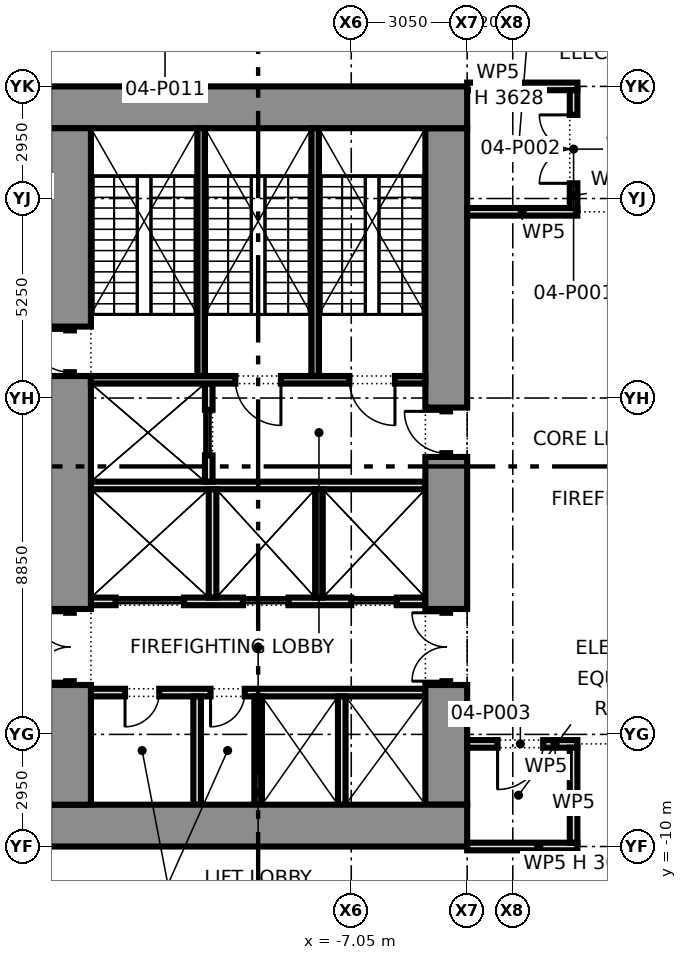
"""IFC4 building model, lengths in metres.
Left out: names, types, materials, properties, quantities, classifications, styles, units other than length and angle.
Written with IfcOpenShell. Run it as: python <this file> out.ifc"""

import sys

from ifc_helpers import new_model, si_unit, direction, frame, frame_2d, origin, place, context, subcontext, project, spatial, rectangle, extrude, element, fill, save


model = new_model("IFC4")
c1 = context("Model", 3, precision=1e-05, world=origin(), true_north=direction((0.0, 1.0)))
c2 = subcontext(c1, "Body", "Model", "MODEL_VIEW")
j1 = project(units=[si_unit("LENGTHUNIT", "METRE"), si_unit("PLANEANGLEUNIT", "RADIAN")], contexts=[c1])
p1 = place(None, origin())
s1 = spatial("IfcSite", under=j1, at=p1, CompositionType="ELEMENT")
p2 = place(p1, origin())
s2 = spatial("IfcBuilding", under=s1, at=p2, CompositionType="ELEMENT")
p3 = place(p2, frame((0.0, 0.0, 16.1)))
s3 = spatial("IfcBuildingStorey", under=s2, at=p3, CompositionType="ELEMENT", Elevation=16.1)
for number, where, z_axis, x_axis in (
    (1, (-15.0, -9.45, 0.0), (0.0, 0.0, 1.0), (1.0, 0.0, 0.0)),
    (2, (-15.0, 9.45, 0.0), (0.0, 0.0, 1.0), (1.0, 0.0, 0.0)),
):
    element("IfcWall", number, at=place(p3, frame(where, z_axis=z_axis, x_axis=x_axis)), inside=s3, PredefinedType="SHEAR", context=c2, shape_type="SweptSolid", body=[
        extrude(rectangle(XDim=11.0, YDim=1.1, at=frame_2d((5.5, 0.0))), origin(), (0.0, 0.0, 1.0), 4.575),
    ])
p4 = place(p3, frame((-14.45, -8.9, 0.0), z_axis=(0.0, 0.0, 1.0), x_axis=(0.0, 1.0, 0.0)))
e3 = element("IfcWall", 3, at=p4, inside=s3, PredefinedType="SHEAR", context=c2, shape_type="SweptSolid", body=[
    extrude(rectangle(XDim=3.15, YDim=1.1, at=frame_2d((1.575, 0.0))), origin(), (0.0, 0.0, 1.0), 4.575),
])
p5 = place(p3, frame((-14.45, -5.75, 0.0), z_axis=(0.0, 0.0, 1.0), x_axis=(0.0, 1.0, 0.0)))
e4 = element("IfcWall", 4, at=p5, inside=s3, PredefinedType="PARTITIONING", context=c2, shape_type="SweptSolid", body=[
    extrude(rectangle(XDim=2.0, YDim=0.2, at=frame_2d((1.0, 0.0))), origin(), (0.0, 0.0, 1.0), 2.4),
])
p6 = place(p5, frame((0.1, 0.0, 0.0)))
e5 = element("IfcOpeningElement", 5, at=p6, cuts=e4, PredefinedType="OPENING", context=c2, shape_type="SweptSolid", body=[
    extrude(rectangle(XDim=1.8, YDim=2.1, at=frame_2d((0.9, 1.05))), frame((0.0, 0.11, 0.0), z_axis=(0.0, -1.0, 0.0), x_axis=(1.0, 0.0, 0.0)), (0.0, 0.0, 1.0), 0.22),
])
p7 = place(p3, frame((-14.45, -3.75, 0.0), z_axis=(0.0, 0.0, 1.0), x_axis=(0.0, 1.0, 0.0)))
e6 = element("IfcWall", 6, at=p7, inside=s3, PredefinedType="SHEAR", context=c2, shape_type="SweptSolid", body=[
    extrude(rectangle(XDim=6.13, YDim=1.1, at=frame_2d((3.065, 0.0))), origin(), (0.0, 0.0, 1.0), 4.575),
])
p8 = place(p3, frame((-14.45, 2.38, 0.0), z_axis=(0.0, 0.0, 1.0), x_axis=(0.0, 1.0, 0.0)))
e7 = element("IfcWall", 7, at=p8, inside=s3, PredefinedType="SHEAR", context=c2, shape_type="SweptSolid", body=[
    extrude(rectangle(XDim=1.3, YDim=0.2, at=frame_2d((0.65, 0.0))), origin(), (0.0, 0.0, 1.0), 2.4),
])
p9 = place(p8, frame((0.1, 0.0, 0.0)))
e8 = element("IfcOpeningElement", 8, at=p9, cuts=e7, PredefinedType="OPENING", context=c2, shape_type="SweptSolid", body=[
    extrude(rectangle(XDim=1.1, YDim=2.1, at=frame_2d((0.55, 1.05))), frame((0.0, 0.11, 0.0), z_axis=(0.0, -1.0, 0.0), x_axis=(1.0, 0.0, 0.0)), (0.0, 0.0, 1.0), 0.22),
])
p10 = place(p3, frame((-14.45, 3.68, 0.0), z_axis=(0.0, 0.0, 1.0), x_axis=(0.0, 1.0, 0.0)))
e9 = element("IfcWall", 9, at=p10, inside=s3, PredefinedType="SHEAR", context=c2, shape_type="SweptSolid", body=[
    extrude(rectangle(XDim=5.22, YDim=1.1, at=frame_2d((2.61, 0.0))), origin(), (0.0, 0.0, 1.0), 4.575),
])
p11 = place(p3, frame((-4.55, -8.9, 0.0), z_axis=(0.0, 0.0, 1.0), x_axis=(0.0, 1.0, 0.0)))
e10 = element("IfcWall", 10, at=p11, inside=s3, PredefinedType="SHEAR", context=c2, shape_type="SweptSolid", body=[
    extrude(rectangle(XDim=3.15, YDim=1.1, at=frame_2d((1.575, 0.0))), origin(), (0.0, 0.0, 1.0), 4.575),
])
p12 = place(p3, frame((-4.55, -5.75, 0.0), z_axis=(0.0, 0.0, 1.0), x_axis=(0.0, 1.0, 0.0)))
e11 = element("IfcWall", 11, at=p12, inside=s3, PredefinedType="PARTITIONING", context=c2, shape_type="SweptSolid", body=[
    extrude(rectangle(XDim=2.0, YDim=0.2, at=frame_2d((1.0, 0.0))), origin(), (0.0, 0.0, 1.0), 2.4),
])
p13 = place(p12, frame((0.1, 0.0, 0.0)))
e12 = element("IfcOpeningElement", 12, at=p13, cuts=e11, PredefinedType="OPENING", context=c2, shape_type="SweptSolid", body=[
    extrude(rectangle(XDim=1.8, YDim=2.1, at=frame_2d((0.9, 1.05))), frame((0.0, 0.11, 0.0), z_axis=(0.0, -1.0, 0.0), x_axis=(1.0, 0.0, 0.0)), (0.0, 0.0, 1.0), 0.22),
])
p14 = place(p3, frame((-4.55, -3.75, 0.0), z_axis=(0.0, 0.0, 1.0), x_axis=(0.0, 1.0, 0.0)))
e13 = element("IfcWall", 13, at=p14, inside=s3, PredefinedType="SHEAR", context=c2, shape_type="SweptSolid", body=[
    extrude(rectangle(XDim=4.0, YDim=1.1, at=frame_2d((2.0, 0.0))), origin(), (0.0, 0.0, 1.0), 4.575),
])
p15 = place(p3, frame((-4.55, 0.25, 0.0), z_axis=(0.0, 0.0, 1.0), x_axis=(0.0, 1.0, 0.0)))
e14 = element("IfcWall", 14, at=p15, inside=s3, PredefinedType="PARTITIONING", context=c2, shape_type="SweptSolid", body=[
    extrude(rectangle(XDim=1.3, YDim=0.2, at=frame_2d((0.65, 0.0))), origin(), (0.0, 0.0, 1.0), 2.4),
])
p16 = place(p15, frame((0.1, 0.0, 0.0)))
e15 = element("IfcOpeningElement", 15, at=p16, cuts=e14, PredefinedType="OPENING", context=c2, shape_type="SweptSolid", body=[
    extrude(rectangle(XDim=1.1, YDim=2.1, at=frame_2d((0.55, 1.05))), frame((0.0, 0.11, 0.0), z_axis=(0.0, -1.0, 0.0), x_axis=(1.0, 0.0, 0.0)), (0.0, 0.0, 1.0), 0.22),
])
p17 = place(p3, frame((-4.55, 1.55, 0.0), z_axis=(0.0, 0.0, 1.0), x_axis=(0.0, 1.0, 0.0)))
e16 = element("IfcWall", 16, at=p17, inside=s3, PredefinedType="SHEAR", context=c2, shape_type="SweptSolid", body=[
    extrude(rectangle(XDim=7.35, YDim=1.1, at=frame_2d((3.675, 0.0))), origin(), (0.0, 0.0, 1.0), 4.575),
])
p18 = place(p3, frame((-13.9, -5.95, 0.0), z_axis=(0.0, 0.0, 1.0), x_axis=(1.0, 0.0, 0.0)))
e17 = element("IfcWall", 17, at=p18, inside=s3, PredefinedType="PARTITIONING", context=c2, shape_type="SweptSolid", body=[
    extrude(rectangle(XDim=8.8, YDim=0.2, at=frame_2d((4.4, 0.0))), origin(), (0.0, 0.0, 1.0), 4.575),
])
p19 = place(p18, frame((0.897, 0.0, 0.0)))
e18 = element("IfcOpeningElement", 18, at=p19, cuts=e17, PredefinedType="OPENING", context=c2, shape_type="SweptSolid", body=[
    extrude(rectangle(XDim=0.9, YDim=2.1, at=frame_2d((0.45, 1.05))), frame((0.0, 0.11, 0.0), z_axis=(0.0, -1.0, 0.0), x_axis=(1.0, 0.0, 0.0)), (0.0, 0.0, 1.0), 0.22),
])
p20 = place(p18, frame((3.147, 0.0, 0.0)))
e19 = element("IfcOpeningElement", 19, at=p20, cuts=e17, PredefinedType="OPENING", context=c2, shape_type="SweptSolid", body=[
    extrude(rectangle(XDim=0.9, YDim=2.1, at=frame_2d((0.45, 1.05))), frame((0.0, 0.11, 0.0), z_axis=(0.0, -1.0, 0.0), x_axis=(1.0, 0.0, 0.0)), (0.0, 0.0, 1.0), 0.22),
])
p21 = place(p3, frame((-13.9, -3.55, 0.0), z_axis=(0.0, 0.0, 1.0), x_axis=(1.0, 0.0, 0.0)))
e20 = element("IfcWall", 20, at=p21, inside=s3, PredefinedType="PARTITIONING", context=c2, shape_type="SweptSolid", body=[
    extrude(rectangle(XDim=8.8, YDim=0.2, at=frame_2d((4.4, 0.0))), origin(), (0.0, 0.0, 1.0), 4.575),
])
p22 = place(p21, frame((0.65, 0.0, 0.0)))
e21 = element("IfcOpeningElement", 21, at=p22, cuts=e20, PredefinedType="OPENING", context=c2, shape_type="SweptSolid", body=[
    extrude(rectangle(XDim=1.8, YDim=2.1, at=frame_2d((0.9, 1.05))), frame((0.0, 0.11, 0.0), z_axis=(0.0, -1.0, 0.0), x_axis=(1.0, 0.0, 0.0)), (0.0, 0.0, 1.0), 0.22),
])
p23 = place(p21, frame((4.0, 0.0, 0.0)))
e22 = element("IfcOpeningElement", 22, at=p23, cuts=e20, PredefinedType="OPENING", context=c2, shape_type="SweptSolid", body=[
    extrude(rectangle(XDim=1.2, YDim=2.1, at=frame_2d((0.6, 1.05))), frame((0.0, 0.11, 0.0), z_axis=(0.0, -1.0, 0.0), x_axis=(1.0, 0.0, 0.0)), (0.0, 0.0, 1.0), 0.22),
])
p24 = place(p21, frame((6.85, 0.0, 0.0)))
e23 = element("IfcOpeningElement", 23, at=p24, cuts=e20, PredefinedType="OPENING", context=c2, shape_type="SweptSolid", body=[
    extrude(rectangle(XDim=1.2, YDim=2.1, at=frame_2d((0.6, 1.05))), frame((0.0, 0.11, 0.0), z_axis=(0.0, -1.0, 0.0), x_axis=(1.0, 0.0, 0.0)), (0.0, 0.0, 1.0), 0.22),
])
p25 = place(p3, frame((-13.9, -0.5, 0.0), z_axis=(0.0, 0.0, 1.0), x_axis=(1.0, 0.0, 0.0)))
e24 = element("IfcWall", 24, at=p25, inside=s3, PredefinedType="PARTITIONING", context=c2, shape_type="SweptSolid", body=[
    extrude(rectangle(XDim=8.8, YDim=0.2, at=frame_2d((4.4, 0.0))), origin(), (0.0, 0.0, 1.0), 4.575),
])
p26 = place(p3, frame((-10.8, -0.4, 0.0), z_axis=(0.0, 0.0, 1.0), x_axis=(0.0, 1.0, 0.0)))
e25 = element("IfcWall", 25, at=p26, inside=s3, PredefinedType="PARTITIONING", context=c2, shape_type="SweptSolid", body=[
    extrude(rectangle(XDim=2.58, YDim=0.2, at=frame_2d((1.29, 0.0))), origin(), (0.0, 0.0, 1.0), 4.575),
])
p27 = place(p26, frame((0.69, 0.0, 0.0)))
e26 = element("IfcOpeningElement", 26, at=p27, cuts=e25, PredefinedType="OPENING", context=c2, shape_type="SweptSolid", body=[
    extrude(rectangle(XDim=1.2, YDim=2.1, at=frame_2d((0.6, 1.05))), frame((0.0, 0.11, 0.0), z_axis=(0.0, -1.0, 0.0), x_axis=(1.0, 0.0, 0.0)), (0.0, 0.0, 1.0), 0.22),
])
p28 = place(p3, frame((-13.9, 2.28, 0.0), z_axis=(0.0, 0.0, 1.0), x_axis=(1.0, 0.0, 0.0)))
e27 = element("IfcWall", 27, at=p28, inside=s3, PredefinedType="SHEAR", context=c2, shape_type="SweptSolid", body=[
    extrude(rectangle(XDim=8.8, YDim=0.2, at=frame_2d((4.4, 0.0))), origin(), (0.0, 0.0, 1.0), 4.575),
])
p29 = place(p28, frame((3.8, 0.0, 0.0)))
e28 = element("IfcOpeningElement", 28, at=p29, cuts=e27, PredefinedType="OPENING", context=c2, shape_type="SweptSolid", body=[
    extrude(rectangle(XDim=1.2, YDim=2.1, at=frame_2d((0.6, 1.05))), frame((0.0, 0.11, 0.0), z_axis=(0.0, -1.0, 0.0), x_axis=(1.0, 0.0, 0.0)), (0.0, 0.0, 1.0), 0.22),
])
p30 = place(p28, frame((6.8, 0.0, 0.0)))
e29 = element("IfcOpeningElement", 29, at=p30, cuts=e27, PredefinedType="OPENING", context=c2, shape_type="SweptSolid", body=[
    extrude(rectangle(XDim=1.2, YDim=2.1, at=frame_2d((0.6, 1.05))), frame((0.0, 0.11, 0.0), z_axis=(0.0, -1.0, 0.0), x_axis=(1.0, 0.0, 0.0)), (0.0, 0.0, 1.0), 0.22),
])
for number, where, z_axis, x_axis in (
    (30, (-11.0, 2.38, 0.0), (0.0, 0.0, 1.0), (0.0, 1.0, 0.0)),
    (31, (-8.0, 2.38, 0.0), (0.0, 0.0, 1.0), (0.0, 1.0, 0.0)),
):
    element("IfcWall", number, at=place(p3, frame(where, z_axis=z_axis, x_axis=x_axis)), inside=s3, PredefinedType="SHEAR", context=c2, shape_type="SweptSolid", body=[
        extrude(rectangle(XDim=6.52, YDim=0.2, at=frame_2d((3.26, 0.0))), origin(), (0.0, 0.0, 1.0), 4.575),
    ])
for number, where, z_axis, x_axis in (
    (32, (-9.5, -8.9, 0.0), (0.0, 0.0, 1.0), (0.0, 1.0, 0.0)),
    (33, (-7.3, -8.9, 0.0), (0.0, 0.0, 1.0), (0.0, 1.0, 0.0)),
    (34, (-11.105, -8.9, 0.0), (0.0, 0.0, 1.0), (0.0, 1.0, 0.0)),
    (35, (-10.7, -3.45, 0.0), (0.0, 0.0, 1.0), (0.0, 1.0, 0.0)),
    (36, (-7.9, -3.45, 0.0), (0.0, 0.0, 1.0), (0.0, 1.0, 0.0)),
):
    element("IfcWall", number, at=place(p3, frame(where, z_axis=z_axis, x_axis=x_axis)), inside=s3, PredefinedType="PARTITIONING", context=c2, shape_type="SweptSolid", body=[
        extrude(rectangle(XDim=2.85, YDim=0.2, at=frame_2d((1.425, 0.0))), origin(), (0.0, 0.0, 1.0), 4.575),
    ])
p31 = place(p3, frame((-4.0, -10.0, 0.0), z_axis=(0.0, 0.0, 1.0), x_axis=(1.0, 0.0, 0.0)))
e37 = element("IfcWall", 37, at=p31, inside=s3, PredefinedType="PARTITIONING", context=c2, shape_type="SweptSolid", body=[
    extrude(rectangle(XDim=2.9, YDim=0.2, at=frame_2d((1.45, 0.0))), origin(), (0.0, 0.0, 1.0), 3.627),
])
p32 = place(p3, frame((-4.0, -7.3, 0.0), z_axis=(0.0, 0.0, 1.0), x_axis=(1.0, 0.0, 0.0)))
e38 = element("IfcWall", 38, at=p32, inside=s3, PredefinedType="PARTITIONING", context=c2, shape_type="SweptSolid", body=[
    extrude(rectangle(XDim=2.9, YDim=0.2, at=frame_2d((1.45, 0.0))), origin(), (0.0, 0.0, 1.0), 4.575),
])
p33 = place(p32, frame((0.8, 0.0, 0.0)))
e39 = element("IfcOpeningElement", 39, at=p33, cuts=e38, PredefinedType="OPENING", context=c2, shape_type="SweptSolid", body=[
    extrude(rectangle(XDim=1.2, YDim=2.1, at=frame_2d((0.6, 1.05))), frame((0.0, 0.11, 0.0), z_axis=(0.0, -1.0, 0.0), x_axis=(1.0, 0.0, 0.0)), (0.0, 0.0, 1.0), 0.22),
])
p34 = place(p3, frame((-4.0, 6.7, 0.0), z_axis=(0.0, 0.0, 1.0), x_axis=(1.0, 0.0, 0.0)))
e40 = element("IfcWall", 40, at=p34, inside=s3, PredefinedType="PARTITIONING", context=c2, shape_type="SweptSolid", body=[
    extrude(rectangle(XDim=2.9, YDim=0.2, at=frame_2d((1.45, 0.0))), origin(), (0.0, 0.0, 1.0), 4.575),
])
p35 = place(p3, frame((-4.0, 10.0, 0.0), z_axis=(0.0, 0.0, 1.0), x_axis=(1.0, 0.0, 0.0)))
e41 = element("IfcWall", 41, at=p35, inside=s3, PredefinedType="PARTITIONING", context=c2, shape_type="SweptSolid", body=[
    extrude(rectangle(XDim=2.9, YDim=0.2, at=frame_2d((1.45, 0.0))), origin(), (0.0, 0.0, 1.0), 3.627),
])
p36 = place(p3, frame((-1.2, -9.9, 0.0), z_axis=(0.0, 0.0, 1.0), x_axis=(0.0, 1.0, 0.0)))
e42 = element("IfcWall", 42, at=p36, inside=s3, PredefinedType="PARTITIONING", context=c2, shape_type="SweptSolid", body=[
    extrude(rectangle(XDim=2.5, YDim=0.2, at=frame_2d((1.25, 0.0))), origin(), (0.0, 0.0, 1.0), 4.575),
])
p37 = place(p3, frame((-1.2, 6.8, 0.0), z_axis=(0.0, 0.0, 1.0), x_axis=(0.0, 1.0, 0.0)))
e43 = element("IfcWall", 43, at=p37, inside=s3, PredefinedType="PARTITIONING", context=c2, shape_type="SweptSolid", body=[
    extrude(rectangle(XDim=3.1, YDim=0.2, at=frame_2d((1.55, 0.0))), origin(), (0.0, 0.0, 1.0), 4.575),
])
p38 = place(p37, frame((0.65, 0.0, 0.0)))
e44 = element("IfcOpeningElement", 44, at=p38, cuts=e43, PredefinedType="OPENING", context=c2, shape_type="SweptSolid", body=[
    extrude(rectangle(XDim=1.8, YDim=2.1, at=frame_2d((0.9, 1.05))), frame((0.0, 0.11, 0.0), z_axis=(0.0, -1.0, 0.0), x_axis=(1.0, 0.0, 0.0)), (0.0, 0.0, 1.0), 0.22),
])
p39 = place(p6, origin())
e45 = element("IfcDoor", 45, at=p39, inside=s3, OperationType="DOUBLE_DOOR_SINGLE_SWING", PredefinedType="DOOR", context=c2, shape_type="SweptSolid", body=[
    extrude(rectangle(XDim=1.8, YDim=2.1, at=frame_2d((0.9, 1.05))), frame((0.0, 0.025, 0.0), z_axis=(0.0, -1.0, 0.0), x_axis=(1.0, 0.0, 0.0)), (0.0, 0.0, 1.0), 0.05),
])
fill(e5, e45)
p40 = place(p9, origin())
e46 = element("IfcDoor", 46, at=p40, inside=s3, OperationType="SINGLE_SWING_RIGHT", PredefinedType="DOOR", context=c2, shape_type="SweptSolid", body=[
    extrude(rectangle(XDim=1.1, YDim=2.1, at=frame_2d((0.55, 1.05))), frame((0.0, 0.025, 0.0), z_axis=(0.0, -1.0, 0.0), x_axis=(1.0, 0.0, 0.0)), (0.0, 0.0, 1.0), 0.05),
])
fill(e8, e46)
p41 = place(p13, origin())
e47 = element("IfcDoor", 47, at=p41, inside=s3, OperationType="DOUBLE_DOOR_SINGLE_SWING", PredefinedType="DOOR", context=c2, shape_type="SweptSolid", body=[
    extrude(rectangle(XDim=1.8, YDim=2.1, at=frame_2d((0.9, 1.05))), frame((0.0, 0.025, 0.0), z_axis=(0.0, -1.0, 0.0), x_axis=(1.0, 0.0, 0.0)), (0.0, 0.0, 1.0), 0.05),
])
fill(e12, e47)
p42 = place(p16, origin())
e48 = element("IfcDoor", 48, at=p42, inside=s3, OperationType="SINGLE_SWING_RIGHT", PredefinedType="DOOR", context=c2, shape_type="SweptSolid", body=[
    extrude(rectangle(XDim=1.1, YDim=2.1, at=frame_2d((0.55, 1.05))), frame((0.0, 0.025, 0.0), z_axis=(0.0, -1.0, 0.0), x_axis=(1.0, 0.0, 0.0)), (0.0, 0.0, 1.0), 0.05),
])
fill(e15, e48)
p43 = place(p22, origin())
e49 = element("IfcDoor", 49, at=p43, inside=s3, OperationType="DOUBLE_DOOR_SLIDING", PredefinedType="DOOR", context=c2, shape_type="SweptSolid", body=[
    extrude(rectangle(XDim=1.8, YDim=2.1, at=frame_2d((0.9, 1.05))), frame((0.0, 0.025, 0.0), z_axis=(0.0, -1.0, 0.0), x_axis=(1.0, 0.0, 0.0)), (0.0, 0.0, 1.0), 0.05),
])
fill(e21, e49)
p44 = place(p23, origin())
e50 = element("IfcDoor", 50, at=p44, inside=s3, OperationType="DOUBLE_DOOR_SLIDING", PredefinedType="DOOR", context=c2, shape_type="SweptSolid", body=[
    extrude(rectangle(XDim=1.2, YDim=2.1, at=frame_2d((0.6, 1.05))), frame((0.0, 0.025, 0.0), z_axis=(0.0, -1.0, 0.0), x_axis=(1.0, 0.0, 0.0)), (0.0, 0.0, 1.0), 0.05),
])
fill(e22, e50)
p45 = place(p24, origin())
e51 = element("IfcDoor", 51, at=p45, inside=s3, OperationType="DOUBLE_DOOR_SLIDING", PredefinedType="DOOR", context=c2, shape_type="SweptSolid", body=[
    extrude(rectangle(XDim=1.2, YDim=2.1, at=frame_2d((0.6, 1.05))), frame((0.0, 0.025, 0.0), z_axis=(0.0, -1.0, 0.0), x_axis=(1.0, 0.0, 0.0)), (0.0, 0.0, 1.0), 0.05),
])
fill(e23, e51)
p46 = place(p27, origin())
e52 = element("IfcDoor", 52, at=p46, inside=s3, OperationType="DOUBLE_DOOR_SLIDING", PredefinedType="DOOR", context=c2, shape_type="SweptSolid", body=[
    extrude(rectangle(XDim=1.2, YDim=2.1, at=frame_2d((0.6, 1.05))), frame((0.0, 0.025, 0.0), z_axis=(0.0, -1.0, 0.0), x_axis=(1.0, 0.0, 0.0)), (0.0, 0.0, 1.0), 0.05),
])
fill(e26, e52)
p47 = place(p19, frame((0.9, 0.0, 0.0), z_axis=(0.0, 0.0, 1.0), x_axis=(-1.0, 0.0, 0.0)))
e53 = element("IfcDoor", 53, at=p47, inside=s3, OperationType="SINGLE_SWING_RIGHT", PredefinedType="DOOR", context=c2, shape_type="SweptSolid", body=[
    extrude(rectangle(XDim=0.9, YDim=2.1, at=frame_2d((0.45, 1.05))), frame((0.0, 0.025, 0.0), z_axis=(0.0, -1.0, 0.0), x_axis=(1.0, 0.0, 0.0)), (0.0, 0.0, 1.0), 0.05),
])
fill(e18, e53)
p48 = place(p20, frame((0.9, 0.0, 0.0), z_axis=(0.0, 0.0, 1.0), x_axis=(-1.0, 0.0, 0.0)))
e54 = element("IfcDoor", 54, at=p48, inside=s3, OperationType="SINGLE_SWING_RIGHT", PredefinedType="DOOR", context=c2, shape_type="SweptSolid", body=[
    extrude(rectangle(XDim=0.9, YDim=2.1, at=frame_2d((0.45, 1.05))), frame((0.0, 0.025, 0.0), z_axis=(0.0, -1.0, 0.0), x_axis=(1.0, 0.0, 0.0)), (0.0, 0.0, 1.0), 0.05),
])
fill(e19, e54)
p49 = place(p29, frame((1.2, 0.0, 0.0), z_axis=(0.0, 0.0, 1.0), x_axis=(-1.0, 0.0, 0.0)))
e55 = element("IfcDoor", 55, at=p49, inside=s3, OperationType="SINGLE_SWING_LEFT", PredefinedType="DOOR", context=c2, shape_type="SweptSolid", body=[
    extrude(rectangle(XDim=1.2, YDim=2.1, at=frame_2d((0.6, 1.05))), frame((0.0, 0.025, 0.0), z_axis=(0.0, -1.0, 0.0), x_axis=(1.0, 0.0, 0.0)), (0.0, 0.0, 1.0), 0.05),
])
fill(e28, e55)
p50 = place(p30, frame((1.2, 0.0, 0.0), z_axis=(0.0, 0.0, 1.0), x_axis=(-1.0, 0.0, 0.0)))
e56 = element("IfcDoor", 56, at=p50, inside=s3, OperationType="SINGLE_SWING_LEFT", PredefinedType="DOOR", context=c2, shape_type="SweptSolid", body=[
    extrude(rectangle(XDim=1.2, YDim=2.1, at=frame_2d((0.6, 1.05))), frame((0.0, 0.025, 0.0), z_axis=(0.0, -1.0, 0.0), x_axis=(1.0, 0.0, 0.0)), (0.0, 0.0, 1.0), 0.05),
])
fill(e29, e56)
p51 = place(p38, origin())
e57 = element("IfcDoor", 57, at=p51, inside=s3, OperationType="DOUBLE_DOOR_SINGLE_SWING", PredefinedType="DOOR", context=c2, shape_type="SweptSolid", body=[
    extrude(rectangle(XDim=1.8, YDim=2.1, at=frame_2d((0.9, 1.05))), frame((0.0, 0.025, 0.0), z_axis=(0.0, -1.0, 0.0), x_axis=(1.0, 0.0, 0.0)), (0.0, 0.0, 1.0), 0.05),
])
fill(e44, e57)
p52 = place(p33, frame((1.2, 0.0, 0.0), z_axis=(0.0, 0.0, 1.0), x_axis=(-1.0, 0.0, 0.0)))
e58 = element("IfcDoor", 58, at=p52, inside=s3, OperationType="SINGLE_SWING_RIGHT", PredefinedType="DOOR", context=c2, shape_type="SweptSolid", body=[
    extrude(rectangle(XDim=1.2, YDim=2.1, at=frame_2d((0.6, 1.05))), frame((0.0, 0.025, 0.0), z_axis=(0.0, -1.0, 0.0), x_axis=(1.0, 0.0, 0.0)), (0.0, 0.0, 1.0), 0.05),
])
fill(e39, e58)
save(model, sys.argv[1])
